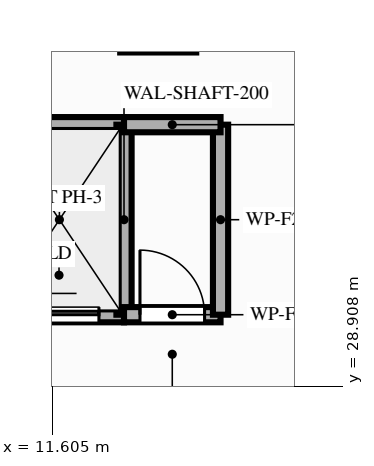
"""IFC4 building model, lengths in metres.
Left out: names, types, materials, properties, quantities, classifications, styles, units other than length and angle.
Written with IfcOpenShell. Run it as: python <this file> out.ifc"""

import sys

from ifc_helpers import new_model, si_unit, direction, frame, frame_2d, origin, place, context, subcontext, project, spatial, rectangle, extrude, element, fill, save


model = new_model("IFC4")
c1 = context("Model", 3, precision=1e-05, world=origin(), true_north=direction((0.0, 1.0)))
c2 = subcontext(c1, "Body", "Model", "MODEL_VIEW")
j1 = project(units=[si_unit("LENGTHUNIT", "METRE"), si_unit("PLANEANGLEUNIT", "RADIAN")], contexts=[c1])
p1 = place(None, origin())
s1 = spatial("IfcSite", under=j1, at=p1, CompositionType="ELEMENT")
p2 = place(p1, origin())
s2 = spatial("IfcBuilding", under=s1, at=p2, CompositionType="ELEMENT")
p3 = place(p2, frame((0.0, 0.0, 169.6)))
s3 = spatial("IfcBuildingStorey", under=s2, at=p3, CompositionType="ELEMENT", Elevation=169.6)
p4 = place(p3, frame((7.0, 29.85, 0.0), z_axis=(0.0, 0.0, 1.0), x_axis=(1.0, 0.0, 0.0)))
e1 = element("IfcWall", 1, at=p4, inside=s3, PredefinedType="MOVABLE", context=c2, shape_type="SweptSolid", body=[
    extrude(rectangle(XDim=5.55, YDim=0.2, at=frame_2d((2.775, 0.0))), origin(), (0.0, 0.0, 1.0), 3.02),
])
p5 = place(p4, frame((0.38, 0.0, 0.0)))
e2 = element("IfcOpeningElement", 2, at=p5, cuts=e1, PredefinedType="OPENING", context=c2, shape_type="SweptSolid", body=[
    extrude(rectangle(XDim=1.05, YDim=2.15, at=frame_2d((0.525, 1.075))), frame((0.0, 0.11, 0.0), z_axis=(0.0, -1.0, 0.0), x_axis=(1.0, 0.0, 0.0)), (0.0, 0.0, 1.0), 0.22),
])
p6 = place(p4, frame((2.28, 0.0, 0.0)))
e3 = element("IfcOpeningElement", 3, at=p6, cuts=e1, PredefinedType="OPENING", context=c2, shape_type="SweptSolid", body=[
    extrude(rectangle(XDim=1.05, YDim=2.15, at=frame_2d((0.525, 1.075))), frame((0.0, 0.11, 0.0), z_axis=(0.0, -1.0, 0.0), x_axis=(1.0, 0.0, 0.0)), (0.0, 0.0, 1.0), 0.22),
])
p7 = place(p4, frame((4.17, 0.0, 0.0)))
e4 = element("IfcOpeningElement", 4, at=p7, cuts=e1, PredefinedType="OPENING", context=c2, shape_type="SweptSolid", body=[
    extrude(rectangle(XDim=1.05, YDim=2.15, at=frame_2d((0.525, 1.075))), frame((0.0, 0.11, 0.0), z_axis=(0.0, -1.0, 0.0), x_axis=(1.0, 0.0, 0.0)), (0.0, 0.0, 1.0), 0.22),
])
p8 = place(p3, frame((7.0, 32.35, 0.0), z_axis=(0.0, 0.0, 1.0), x_axis=(1.0, 0.0, 0.0)))
e5 = element("IfcWall", 5, at=p8, inside=s3, PredefinedType="MOVABLE", context=c2, shape_type="SweptSolid", body=[
    extrude(rectangle(XDim=5.55, YDim=0.2, at=frame_2d((2.775, 0.0))), origin(), (0.0, 0.0, 1.0), 3.02),
])
p9 = place(p3, frame((12.55, 29.85, 0.0), z_axis=(0.0, 0.0, 1.0), x_axis=(0.0, 1.0, 0.0)))
e6 = element("IfcWall", 6, at=p9, inside=s3, PredefinedType="MOVABLE", context=c2, shape_type="SweptSolid", body=[
    extrude(rectangle(XDim=2.5, YDim=0.2, at=frame_2d((1.25, 0.0))), origin(), (0.0, 0.0, 1.0), 3.02),
])
p10 = place(p3, frame((12.55, 29.85, 0.0), z_axis=(0.0, 0.0, 1.0), x_axis=(1.0, 0.0, 0.0)))
e7 = element("IfcWall", 7, at=p10, inside=s3, PredefinedType="PARTITIONING", context=c2, shape_type="SweptSolid", body=[
    extrude(rectangle(XDim=1.27, YDim=0.2, at=frame_2d((0.635, 0.0))), origin(), (0.0, 0.0, 1.0), 3.02),
])
p11 = place(p10, frame((0.21, 0.0, 0.0)))
e8 = element("IfcOpeningElement", 8, at=p11, cuts=e7, PredefinedType="OPENING", context=c2, shape_type="SweptSolid", body=[
    extrude(rectangle(XDim=0.85, YDim=2.05, at=frame_2d((0.425, 1.025))), frame((0.0, 0.11, 0.0), z_axis=(0.0, -1.0, 0.0), x_axis=(1.0, 0.0, 0.0)), (0.0, 0.0, 1.0), 0.22),
])
p12 = place(p3, frame((13.82, 29.85, 0.0), z_axis=(0.0, 0.0, 1.0), x_axis=(0.0, 1.0, 0.0)))
e9 = element("IfcWall", 9, at=p12, inside=s3, PredefinedType="PARTITIONING", context=c2, shape_type="SweptSolid", body=[
    extrude(rectangle(XDim=2.5, YDim=0.2, at=frame_2d((1.25, 0.0))), origin(), (0.0, 0.0, 1.0), 3.02),
])
p13 = place(p3, frame((12.55, 32.35, 0.0), z_axis=(0.0, 0.0, 1.0), x_axis=(1.0, 0.0, 0.0)))
e10 = element("IfcWall", 10, at=p13, inside=s3, PredefinedType="PARTITIONING", context=c2, shape_type="SweptSolid", body=[
    extrude(rectangle(XDim=1.27, YDim=0.2, at=frame_2d((0.635, 0.0))), origin(), (0.0, 0.0, 1.0), 3.02),
])
p14 = place(p7, origin())
e11 = element("IfcDoor", 11, at=p14, inside=s3, OperationType="SLIDING_TO_LEFT", PredefinedType="DOOR", context=c2, shape_type="SweptSolid", body=[
    extrude(rectangle(XDim=1.05, YDim=2.15, at=frame_2d((0.525, 1.075))), frame((0.0, 0.025, 0.0), z_axis=(0.0, -1.0, 0.0), x_axis=(1.0, 0.0, 0.0)), (0.0, 0.0, 1.0), 0.05),
])
fill(e4, e11)
p15 = place(p11, origin())
e12 = element("IfcDoor", 12, at=p15, inside=s3, OperationType="SINGLE_SWING_LEFT", PredefinedType="DOOR", context=c2, shape_type="SweptSolid", body=[
    extrude(rectangle(XDim=0.85, YDim=2.05, at=frame_2d((0.425, 1.025))), frame((0.0, 0.025, 0.0), z_axis=(0.0, -1.0, 0.0), x_axis=(1.0, 0.0, 0.0)), (0.0, 0.0, 1.0), 0.05),
])
fill(e8, e12)
save(model, sys.argv[1])
